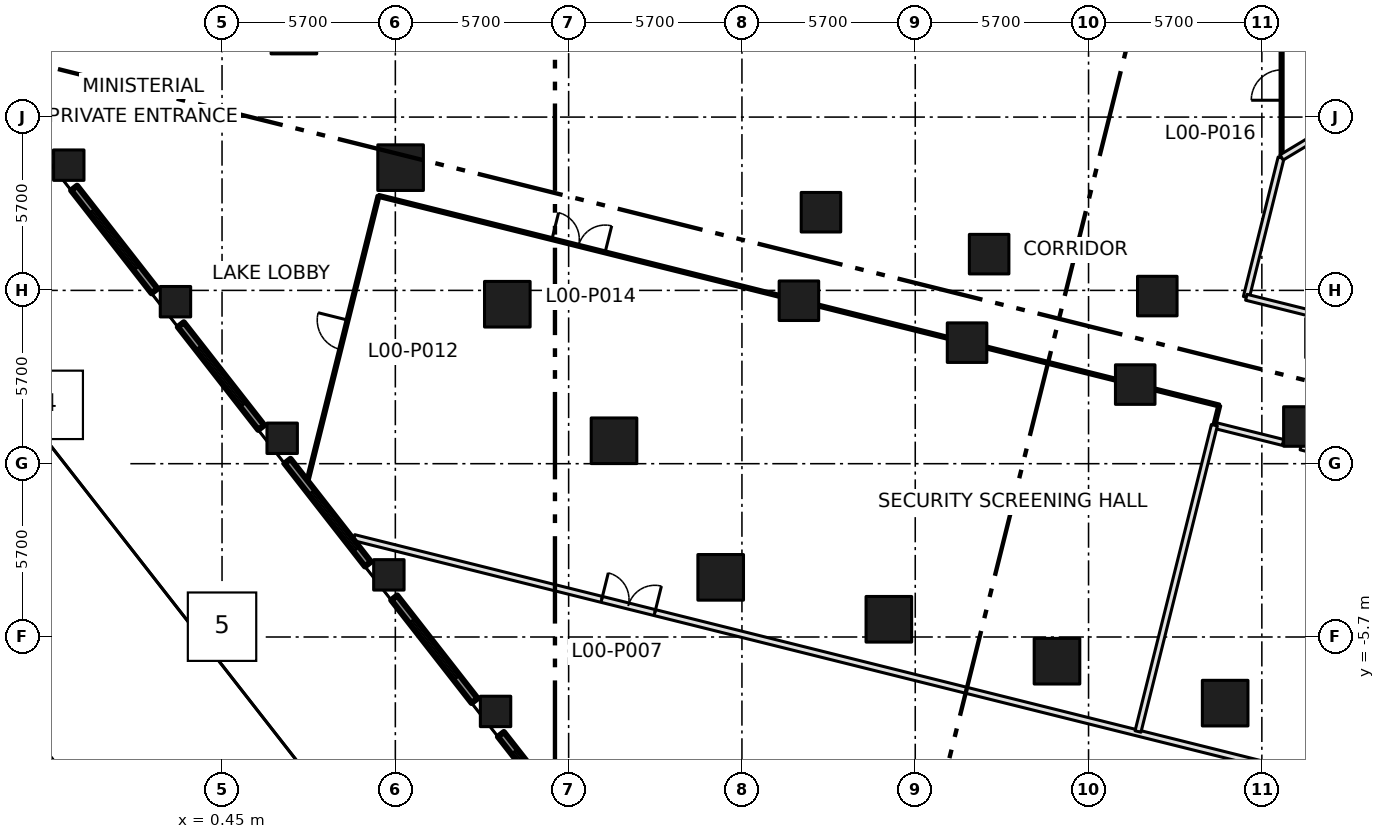
"""IFC4 building model, lengths in metres.
Left out: names, types, materials, properties, quantities, classifications, styles, units other than length and angle.
Written with IfcOpenShell. Run it as: python <this file> out.ifc"""

import sys

from ifc_helpers import new_model, si_unit, direction, frame, frame_2d, origin, origin_2d, place, context, subcontext, project, spatial, rectangle, extrude, element, fill, save


model = new_model("IFC4")
c1 = context("Model", 3, precision=1e-05, world=origin(), true_north=direction((0.0, 1.0)))
c2 = subcontext(c1, "Body", "Model", "MODEL_VIEW")
j1 = project(units=[si_unit("LENGTHUNIT", "METRE"), si_unit("PLANEANGLEUNIT", "RADIAN")], contexts=[c1])
p1 = place(None, origin())
s1 = spatial("IfcSite", under=j1, at=p1, CompositionType="ELEMENT")
p2 = place(p1, origin())
s2 = spatial("IfcBuilding", under=s1, at=p2, CompositionType="ELEMENT")
p3 = place(p2, origin())
s3 = spatial("IfcBuildingStorey", under=s2, at=p3, CompositionType="ELEMENT", Elevation=0.0)
for number, where, z_axis, x_axis in (
    (1, (16.851, -3.738, 0.0), (0.0, 0.0, 1.0), (1.0, 0.0, 0.0)),
    (2, (13.342, 0.754, 0.0), (0.0, 0.0, 1.0), (1.0, 0.0, 0.0)),
    (3, (9.833, 5.245, 0.0), (0.0, 0.0, 1.0), (1.0, 0.0, 0.0)),
    (4, (6.323, 9.737, 0.0), (0.0, 0.0, 1.0), (1.0, 0.0, 0.0)),
    (5, (2.814, 14.229, 0.0), (0.0, 0.0, 1.0), (1.0, 0.0, 0.0)),
    (6, (22.382, -5.117, 0.0), (0.0, 0.0, 1.0), (1.0, 0.0, 0.0)),
    (7, (27.912, -6.496, 0.0), (0.0, 0.0, 1.0), (1.0, 0.0, 0.0)),
    (8, (33.443, -7.875, 0.0), (0.0, 0.0, 1.0), (1.0, 0.0, 0.0)),
):
    element("IfcColumn", number, at=place(p3, frame(where, z_axis=z_axis, x_axis=x_axis)), inside=s3, PredefinedType="COLUMN", context=c2, shape_type="SweptSolid", body=[
        extrude(rectangle(XDim=1.5, YDim=1.5, at=origin_2d()), origin(), (0.0, 0.0, 1.0), 7.2),
    ])
for number, where, z_axis, x_axis in (
    (9, (19.424, 5.36, 0.0), (0.0, 0.0, 1.0), (1.0, 0.0, 0.0)),
    (10, (24.954, 3.981, 0.0), (0.0, 0.0, 1.0), (1.0, 0.0, 0.0)),
    (11, (30.485, 2.602, 0.0), (0.0, 0.0, 1.0), (1.0, 0.0, 0.0)),
    (12, (36.016, 1.223, 0.0), (0.0, 0.0, 1.0), (1.0, 0.0, 0.0)),
    (13, (20.149, 8.271, 0.0), (0.0, 0.0, 1.0), (1.0, 0.0, 0.0)),
    (14, (25.68, 6.892, 0.0), (0.0, 0.0, 1.0), (1.0, 0.0, 0.0)),
    (15, (31.211, 5.513, 0.0), (0.0, 0.0, 1.0), (1.0, 0.0, 0.0)),
):
    element("IfcColumn", number, at=place(p3, frame(where, z_axis=z_axis, x_axis=x_axis)), inside=s3, PredefinedType="COLUMN", context=c2, shape_type="SweptSolid", body=[
        extrude(rectangle(XDim=1.3, YDim=1.3, at=origin_2d()), origin(), (0.0, 0.0, 1.0), 7.2),
    ])
for number, where, z_axis, x_axis in (
    (16, (-4.591, 9.819, 0.0), (0.0, 0.0, 1.0), (1.0, 0.0, 0.0)),
    (17, (-1.082, 5.328, 0.0), (0.0, 0.0, 1.0), (1.0, 0.0, 0.0)),
    (18, (2.428, 0.836, 0.0), (0.0, 0.0, 1.0), (1.0, 0.0, 0.0)),
    (19, (5.937, -3.656, 0.0), (0.0, 0.0, 1.0), (1.0, 0.0, 0.0)),
    (20, (9.446, -8.148, 0.0), (0.0, 0.0, 1.0), (1.0, 0.0, 0.0)),
):
    element("IfcColumn", number, at=place(p3, frame(where, z_axis=z_axis, x_axis=x_axis)), inside=s3, PredefinedType="COLUMN", context=c2, shape_type="SweptSolid", body=[
        extrude(rectangle(XDim=1.0, YDim=1.0, at=origin_2d()), origin(), (0.0, 0.0, 1.0), 7.2),
    ])
p4 = place(p3, frame((3.263, -0.557, 0.0), z_axis=(0.0, 0.0, 1.0), x_axis=(0.241845159871, 0.970314855419, 0.0)))
e21 = element("IfcWall", 21, at=p4, inside=s3, PredefinedType="PARTITIONING", context=c2, shape_type="SweptSolid", body=[
    extrude(rectangle(XDim=9.652, YDim=0.1, at=frame_2d((4.826, 0.0))), origin(), (0.0, 0.0, 1.0), 6.75),
])
p5 = place(p4, frame((4.443, 0.0, 0.0)))
e22 = element("IfcOpeningElement", 22, at=p5, cuts=e21, PredefinedType="OPENING", context=c2, shape_type="SweptSolid", body=[
    extrude(rectangle(XDim=1.0, YDim=2.1, at=frame_2d((0.5, 1.05))), frame((0.0, 0.06, 0.0), z_axis=(0.0, -1.0, 0.0), x_axis=(1.0, 0.0, 0.0)), (0.0, 0.0, 1.0), 0.12),
])
p6 = place(p3, frame((5.597, 8.808, 0.0), z_axis=(0.0, 0.0, 1.0), x_axis=(0.97028530919, -0.241963672417, 0.0)))
e23 = element("IfcWall", 23, at=p6, inside=s3, PredefinedType="PARTITIONING", context=c2, shape_type="SweptSolid", body=[
    extrude(rectangle(XDim=13.56, YDim=0.1, at=frame_2d((6.78, 0.0))), origin(), (0.0, 0.0, 1.0), 6.75),
])
p7 = place(p6, frame((5.88, 0.0, 0.0)))
e24 = element("IfcOpeningElement", 24, at=p7, cuts=e23, PredefinedType="OPENING", context=c2, shape_type="SweptSolid", body=[
    extrude(rectangle(XDim=1.8, YDim=2.1, at=frame_2d((0.9, 1.05))), frame((0.0, 0.06, 0.0), z_axis=(0.0, -1.0, 0.0), x_axis=(1.0, 0.0, 0.0)), (0.0, 0.0, 1.0), 0.12),
])
p8 = place(p3, frame((20.094, 5.193, 0.0), z_axis=(0.0, 0.0, 1.0), x_axis=(0.970321828551, -0.241817181023, 0.0)))
e25 = element("IfcWall", 25, at=p8, inside=s3, PredefinedType="PARTITIONING", context=c2, shape_type="SweptSolid", body=[
    extrude(rectangle(XDim=4.318, YDim=0.1, at=frame_2d((2.159, 0.0))), origin(), (0.0, 0.0, 1.0), 6.75),
])
p9 = place(p3, frame((25.624, 3.814, 0.0), z_axis=(0.0, 0.0, 1.0), x_axis=(0.970295255208, -0.241923784941, 0.0)))
e26 = element("IfcWall", 26, at=p9, inside=s3, PredefinedType="PARTITIONING", context=c2, shape_type="SweptSolid", body=[
    extrude(rectangle(XDim=4.319, YDim=0.1, at=frame_2d((2.16, 0.0))), origin(), (0.0, 0.0, 1.0), 6.75),
])
p10 = place(p3, frame((31.155, 2.435, 0.0), z_axis=(0.0, 0.0, 1.0), x_axis=(0.970335093604, -0.241763947107, 0.0)))
e27 = element("IfcWall", 27, at=p10, inside=s3, PredefinedType="PARTITIONING", context=c2, shape_type="SweptSolid", body=[
    extrude(rectangle(XDim=2.159, YDim=0.1, at=frame_2d((1.08, 0.0))), origin(), (0.0, 0.0, 1.0), 6.75),
])
p11 = place(p3, frame((33.088, 1.262, 0.0), z_axis=(0.0, 0.0, 1.0), x_axis=(0.970296580741, -0.241918468503, 0.0)))
e28 = element("IfcWall", 28, at=p11, inside=s3, PredefinedType="PARTITIONING", context=c2, shape_type="SweptSolid", body=[
    extrude(rectangle(XDim=2.327, YDim=0.2, at=frame_2d((1.164, 0.0))), origin(), (0.0, 0.0, 1.0), 6.75),
])
p12 = place(p3, frame((33.25, 1.913, 0.0), z_axis=(0.0, 0.0, 1.0), x_axis=(-0.241599410153, -0.970376074011, 0.0)))
e29 = element("IfcWall", 29, at=p12, inside=s3, PredefinedType="PARTITIONING", context=c2, shape_type="SweptSolid", body=[
    extrude(rectangle(XDim=0.675, YDim=0.1, at=frame_2d((0.337, 0.0))), origin(), (0.0, 0.0, 1.0), 6.75),
])
p13 = place(p3, frame((34.139, 5.474, 0.0), z_axis=(0.0, 0.0, 1.0), x_axis=(0.241903954762, 0.970300199253, 0.0)))
e30 = element("IfcWall", 30, at=p13, inside=s3, PredefinedType="PARTITIONING", context=c2, shape_type="SweptSolid", body=[
    extrude(rectangle(XDim=4.729, YDim=0.2, at=frame_2d((2.365, 0.0))), origin(), (0.0, 0.0, 1.0), 6.75),
])
p14 = place(p3, frame((35.3, 10.074, 0.0), z_axis=(0.0, 0.0, 1.0), x_axis=(0.0, 1.0, 0.0)))
e31 = element("IfcWall", 31, at=p14, inside=s3, PredefinedType="PARTITIONING", context=c2, shape_type="SweptSolid", body=[
    extrude(rectangle(XDim=12.201, YDim=0.1, at=frame_2d((6.101, 0.0))), origin(), (0.0, 0.0, 1.0), 6.75),
])
p15 = place(p14, frame((1.88, 0.0, 0.0)))
e32 = element("IfcOpeningElement", 32, at=p15, cuts=e31, PredefinedType="OPENING", context=c2, shape_type="SweptSolid", body=[
    extrude(rectangle(XDim=1.0, YDim=2.1, at=frame_2d((0.5, 1.05))), frame((0.0, 0.06, 0.0), z_axis=(0.0, -1.0, 0.0), x_axis=(1.0, 0.0, 0.0)), (0.0, 0.0, 1.0), 0.12),
])
p16 = place(p14, frame((8.006, 0.0, 0.0)))
e33 = element("IfcOpeningElement", 33, at=p16, cuts=e31, PredefinedType="OPENING", context=c2, shape_type="SweptSolid", body=[
    extrude(rectangle(XDim=1.0, YDim=2.1, at=frame_2d((0.5, 1.05))), frame((0.0, 0.06, 0.0), z_axis=(0.0, -1.0, 0.0), x_axis=(1.0, 0.0, 0.0)), (0.0, 0.0, 1.0), 0.12),
])
p17 = place(p3, frame((35.932, 0.553, 0.0), z_axis=(0.0, 0.0, 1.0), x_axis=(0.970286068757, -0.241960626499, 0.0)))
e34 = element("IfcWall", 34, at=p17, inside=s3, PredefinedType="PARTITIONING", context=c2, shape_type="SweptSolid", body=[
    extrude(rectangle(XDim=5.095, YDim=0.2, at=frame_2d((2.548, 0.0))), origin(), (0.0, 0.0, 1.0), 6.75),
])
p18 = place(p3, frame((36.826, 4.804, 0.0), z_axis=(0.0, 0.0, 1.0), x_axis=(-0.970277181538, 0.241996262341, 0.0)))
e35 = element("IfcWall", 35, at=p18, inside=s3, PredefinedType="PARTITIONING", context=c2, shape_type="SweptSolid", body=[
    extrude(rectangle(XDim=2.769, YDim=0.2, at=frame_2d((1.385, 0.0))), origin(), (0.0, 0.0, 1.0), 6.75),
])
p19 = place(p3, frame((4.79, -2.431, 0.0), z_axis=(0.0, 0.0, 1.0), x_axis=(0.970295457836, -0.241922972253, 0.0)))
e36 = element("IfcWall", 36, at=p19, inside=s3, PredefinedType="PARTITIONING", context=c2, shape_type="SweptSolid", body=[
    extrude(rectangle(XDim=60.764, YDim=0.2, at=frame_2d((30.382, 0.0))), origin(), (0.0, 0.0, 1.0), 6.75),
])
p20 = place(p19, frame((42.764, 0.0, 0.0)))
e37 = element("IfcOpeningElement", 37, at=p20, cuts=e36, PredefinedType="OPENING", context=c2, shape_type="SweptSolid", body=[
    extrude(rectangle(XDim=1.8, YDim=2.1, at=frame_2d((0.9, 1.05))), frame((0.0, 0.11, 0.0), z_axis=(0.0, -1.0, 0.0), x_axis=(1.0, 0.0, 0.0)), (0.0, 0.0, 1.0), 0.22),
])
p21 = place(p19, frame((8.397, 0.0, 0.0)))
e38 = element("IfcOpeningElement", 38, at=p21, cuts=e36, PredefinedType="OPENING", context=c2, shape_type="SweptSolid", body=[
    extrude(rectangle(XDim=1.8, YDim=2.1, at=frame_2d((0.9, 1.05))), frame((0.0, 0.11, 0.0), z_axis=(0.0, -1.0, 0.0), x_axis=(1.0, 0.0, 0.0)), (0.0, 0.0, 1.0), 0.22),
])
p22 = place(p3, frame((33.089, 1.266, 0.0), z_axis=(0.0, 0.0, 1.0), x_axis=(-0.241960178305, -0.970286180523, 0.0)))
e39 = element("IfcWall", 39, at=p22, inside=s3, PredefinedType="PARTITIONING", context=c2, shape_type="SweptSolid", body=[
    extrude(rectangle(XDim=10.383, YDim=0.2, at=frame_2d((5.191, 0.0))), origin(), (0.0, 0.0, 1.0), 6.75),
])
p23 = place(p3, frame((39.455, 12.57, 0.0), z_axis=(0.0, 0.0, 1.0), x_axis=(-0.857123872191, -0.515110345189, 0.0)))
e40 = element("IfcWall", 40, at=p23, inside=s3, PredefinedType="PARTITIONING", context=c2, shape_type="SweptSolid", body=[
    extrude(rectangle(XDim=4.848, YDim=0.2, at=frame_2d((2.424, 0.0))), origin(), (0.0, 0.0, 1.0), 6.75),
])
p24 = place(p3, frame((-4.415, 9.066, 0.0), z_axis=(0.0, 0.0, 1.0), x_axis=(0.615713519567, -0.787970089421, 0.0)))
e41 = element("IfcWall", 41, at=p24, inside=s3, PredefinedType="SOLIDWALL", context=c2, shape_type="SweptSolid", body=[
    extrude(rectangle(XDim=4.296, YDim=0.25, at=frame_2d((2.148, 0.0))), origin(), (0.0, 0.0, 1.0), 5.85),
])
p25 = place(p24, frame((0.948, 0.0, 0.9)))
e42 = element("IfcOpeningElement", 42, at=p25, cuts=e41, PredefinedType="OPENING", context=c2, shape_type="SweptSolid", body=[
    extrude(rectangle(XDim=2.4, YDim=4.5, at=frame_2d((1.2, 2.25))), frame((0.0, 0.135, 0.0), z_axis=(0.0, -1.0, 0.0), x_axis=(1.0, 0.0, 0.0)), (0.0, 0.0, 1.0), 0.27),
])
p26 = place(p3, frame((-0.906, 4.575, 0.0), z_axis=(0.0, 0.0, 1.0), x_axis=(0.61574436495, -0.787945986113, 0.0)))
e43 = element("IfcWall", 43, at=p26, inside=s3, PredefinedType="SOLIDWALL", context=c2, shape_type="SweptSolid", body=[
    extrude(rectangle(XDim=4.297, YDim=0.25, at=frame_2d((2.148, 0.0))), origin(), (0.0, 0.0, 1.0), 5.85),
])
p27 = place(p26, frame((0.949, 0.0, 0.9)))
e44 = element("IfcOpeningElement", 44, at=p27, cuts=e43, PredefinedType="OPENING", context=c2, shape_type="SweptSolid", body=[
    extrude(rectangle(XDim=2.4, YDim=4.5, at=frame_2d((1.2, 2.25))), frame((0.0, 0.135, 0.0), z_axis=(0.0, -1.0, 0.0), x_axis=(1.0, 0.0, 0.0)), (0.0, 0.0, 1.0), 0.27),
])
p28 = place(p3, frame((2.604, 0.083, 0.0), z_axis=(0.0, 0.0, 1.0), x_axis=(0.615603242749, -0.788056246417, 0.0)))
e45 = element("IfcWall", 45, at=p28, inside=s3, PredefinedType="SOLIDWALL", context=c2, shape_type="SweptSolid", body=[
    extrude(rectangle(XDim=4.297, YDim=0.25, at=frame_2d((2.148, 0.0))), origin(), (0.0, 0.0, 1.0), 5.85),
])
p29 = place(p28, frame((1.284, 0.0, 0.9)))
e46 = element("IfcOpeningElement", 46, at=p29, cuts=e45, PredefinedType="OPENING", context=c2, shape_type="SweptSolid", body=[
    extrude(rectangle(XDim=2.4, YDim=4.5, at=frame_2d((1.2, 2.25))), frame((0.0, 0.135, 0.0), z_axis=(0.0, -1.0, 0.0), x_axis=(1.0, 0.0, 0.0)), (0.0, 0.0, 1.0), 0.27),
])
p30 = place(p3, frame((6.113, -4.409, 0.0), z_axis=(0.0, 0.0, 1.0), x_axis=(0.615603242749, -0.788056246417, 0.0)))
e47 = element("IfcWall", 47, at=p30, inside=s3, PredefinedType="SOLIDWALL", context=c2, shape_type="SweptSolid", body=[
    extrude(rectangle(XDim=4.297, YDim=0.25, at=frame_2d((2.148, 0.0))), origin(), (0.0, 0.0, 1.0), 5.85),
])
p31 = place(p30, frame((0.948, 0.0, 0.9)))
e48 = element("IfcOpeningElement", 48, at=p31, cuts=e47, PredefinedType="OPENING", context=c2, shape_type="SweptSolid", body=[
    extrude(rectangle(XDim=2.4, YDim=4.5, at=frame_2d((1.2, 2.25))), frame((0.0, 0.135, 0.0), z_axis=(0.0, -1.0, 0.0), x_axis=(1.0, 0.0, 0.0)), (0.0, 0.0, 1.0), 0.27),
])
p32 = place(p3, frame((9.622, -8.901, 0.0), z_axis=(0.0, 0.0, 1.0), x_axis=(0.615703609525, -0.787977832948, 0.0)))
e49 = element("IfcWall", 49, at=p32, inside=s3, PredefinedType="SOLIDWALL", context=c2, shape_type="SweptSolid", body=[
    extrude(rectangle(XDim=2.625, YDim=0.25, at=frame_2d((1.312, 0.0))), origin(), (0.0, 0.0, 1.0), 5.85),
])
p33 = place(p32, frame((0.712, 0.0, 0.9)))
e50 = element("IfcOpeningElement", 50, at=p33, cuts=e49, PredefinedType="OPENING", context=c2, shape_type="SweptSolid", body=[
    extrude(rectangle(XDim=1.2, YDim=4.5, at=frame_2d((0.6, 2.25))), frame((0.0, 0.135, 0.0), z_axis=(0.0, -1.0, 0.0), x_axis=(1.0, 0.0, 0.0)), (0.0, 0.0, 1.0), 0.27),
])
p34 = place(p21, origin())
e51 = element("IfcDoor", 51, at=p34, inside=s3, OperationType="DOUBLE_DOOR_SINGLE_SWING", PredefinedType="DOOR", context=c2, shape_type="SweptSolid", body=[
    extrude(rectangle(XDim=1.8, YDim=2.1, at=frame_2d((0.9, 1.05))), frame((0.0, 0.025, 0.0), z_axis=(0.0, -1.0, 0.0), x_axis=(1.0, 0.0, 0.0)), (0.0, 0.0, 1.0), 0.05),
])
fill(e38, e51)
p35 = place(p5, origin())
e52 = element("IfcDoor", 52, at=p35, inside=s3, OperationType="SINGLE_SWING_RIGHT", PredefinedType="DOOR", context=c2, shape_type="SweptSolid", body=[
    extrude(rectangle(XDim=1.0, YDim=2.1, at=frame_2d((0.5, 1.05))), frame((0.0, 0.025, 0.0), z_axis=(0.0, -1.0, 0.0), x_axis=(1.0, 0.0, 0.0)), (0.0, 0.0, 1.0), 0.05),
])
fill(e22, e52)
p36 = place(p7, origin())
e53 = element("IfcDoor", 53, at=p36, inside=s3, OperationType="DOUBLE_DOOR_SINGLE_SWING", PredefinedType="DOOR", context=c2, shape_type="SweptSolid", body=[
    extrude(rectangle(XDim=1.8, YDim=2.1, at=frame_2d((0.9, 1.05))), frame((0.0, 0.025, 0.0), z_axis=(0.0, -1.0, 0.0), x_axis=(1.0, 0.0, 0.0)), (0.0, 0.0, 1.0), 0.05),
])
fill(e24, e53)
p37 = place(p15, origin())
e54 = element("IfcDoor", 54, at=p37, inside=s3, OperationType="SINGLE_SWING_LEFT", PredefinedType="DOOR", context=c2, shape_type="SweptSolid", body=[
    extrude(rectangle(XDim=1.0, YDim=2.1, at=frame_2d((0.5, 1.05))), frame((0.0, 0.025, 0.0), z_axis=(0.0, -1.0, 0.0), x_axis=(1.0, 0.0, 0.0)), (0.0, 0.0, 1.0), 0.05),
])
fill(e32, e54)
p38 = place(p25, origin())
e55 = element("IfcWindow", 55, at=p38, inside=s3, PartitioningType="DOUBLE_PANEL_VERTICAL", PredefinedType="WINDOW", context=c2, shape_type="SweptSolid", body=[
    extrude(rectangle(XDim=2.4, YDim=4.5, at=frame_2d((1.2, 2.25))), frame((0.0, 0.03, 0.0), z_axis=(0.0, -1.0, 0.0), x_axis=(1.0, 0.0, 0.0)), (0.0, 0.0, 1.0), 0.06),
])
fill(e42, e55)
p39 = place(p27, origin())
e56 = element("IfcWindow", 56, at=p39, inside=s3, PartitioningType="DOUBLE_PANEL_VERTICAL", PredefinedType="WINDOW", context=c2, shape_type="SweptSolid", body=[
    extrude(rectangle(XDim=2.4, YDim=4.5, at=frame_2d((1.2, 2.25))), frame((0.0, 0.03, 0.0), z_axis=(0.0, -1.0, 0.0), x_axis=(1.0, 0.0, 0.0)), (0.0, 0.0, 1.0), 0.06),
])
fill(e44, e56)
p40 = place(p29, origin())
e57 = element("IfcWindow", 57, at=p40, inside=s3, PartitioningType="DOUBLE_PANEL_VERTICAL", PredefinedType="WINDOW", context=c2, shape_type="SweptSolid", body=[
    extrude(rectangle(XDim=2.4, YDim=4.5, at=frame_2d((1.2, 2.25))), frame((0.0, 0.03, 0.0), z_axis=(0.0, -1.0, 0.0), x_axis=(1.0, 0.0, 0.0)), (0.0, 0.0, 1.0), 0.06),
])
fill(e46, e57)
p41 = place(p31, origin())
e58 = element("IfcWindow", 58, at=p41, inside=s3, PartitioningType="DOUBLE_PANEL_VERTICAL", PredefinedType="WINDOW", context=c2, shape_type="SweptSolid", body=[
    extrude(rectangle(XDim=2.4, YDim=4.5, at=frame_2d((1.2, 2.25))), frame((0.0, 0.03, 0.0), z_axis=(0.0, -1.0, 0.0), x_axis=(1.0, 0.0, 0.0)), (0.0, 0.0, 1.0), 0.06),
])
fill(e48, e58)
p42 = place(p33, origin())
e59 = element("IfcWindow", 59, at=p42, inside=s3, PartitioningType="SINGLE_PANEL", PredefinedType="WINDOW", context=c2, shape_type="SweptSolid", body=[
    extrude(rectangle(XDim=1.2, YDim=4.5, at=frame_2d((0.6, 2.25))), frame((0.0, 0.03, 0.0), z_axis=(0.0, -1.0, 0.0), x_axis=(1.0, 0.0, 0.0)), (0.0, 0.0, 1.0), 0.06),
])
fill(e50, e59)
save(model, sys.argv[1])
